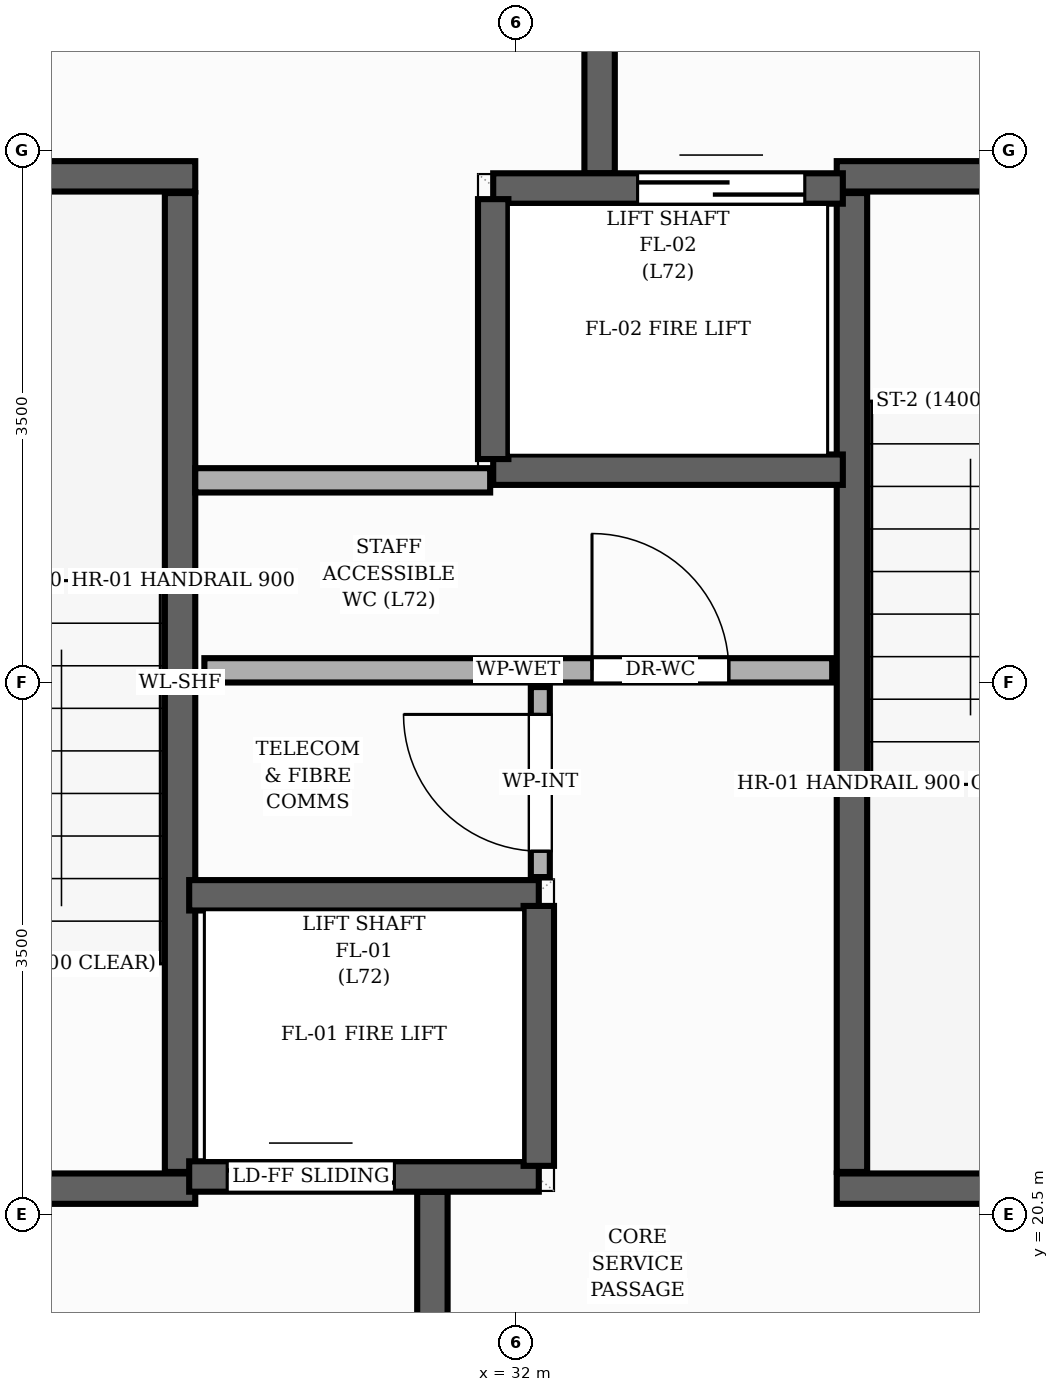
"""IFC4 building model, lengths in metres.
Left out: names, types, materials, properties, quantities, classifications, styles, units other than length and angle.
Written with IfcOpenShell. Run it as: python <this file> out.ifc"""

import sys

from ifc_helpers import new_model, si_unit, direction, frame, frame_2d, origin, place, context, subcontext, project, spatial, rectangle, extrude, element, fill, save


model = new_model("IFC4")
c1 = context("Model", 3, precision=1e-05, world=origin(), true_north=direction((0.0, 1.0)))
c2 = subcontext(c1, "Body", "Model", "MODEL_VIEW")
j1 = project(units=[si_unit("LENGTHUNIT", "METRE"), si_unit("PLANEANGLEUNIT", "RADIAN")], contexts=[c1])
p1 = place(None, origin())
s1 = spatial("IfcSite", under=j1, at=p1, CompositionType="ELEMENT")
p2 = place(p1, origin())
s2 = spatial("IfcBuilding", under=s1, at=p2, CompositionType="ELEMENT")
p3 = place(p2, frame((0.0, 0.0, 239.84)))
s3 = spatial("IfcBuildingStorey", under=s2, at=p3, CompositionType="ELEMENT", Elevation=239.84)
p4 = place(p3, frame((29.79, 20.78, 0.0), z_axis=(0.0, 0.0, 1.0), x_axis=(0.0, 1.0, 0.0)))
e1 = element("IfcWall", 1, at=p4, inside=s3, PredefinedType="SHEAR", context=c2, shape_type="SweptSolid", body=[
    extrude(rectangle(XDim=6.44, YDim=0.2, at=frame_2d((3.22, 0.0))), origin(), (0.0, 0.0, 1.0), 3.2),
])
p5 = place(p3, frame((26.65, 27.33, 0.0), z_axis=(0.0, 0.0, 1.0), x_axis=(1.0, 0.0, 0.0)))
e2 = element("IfcWall", 2, at=p5, inside=s3, PredefinedType="SHEAR", context=c2, shape_type="SweptSolid", body=[
    extrude(rectangle(XDim=3.24, YDim=0.2, at=frame_2d((1.62, 0.0))), origin(), (0.0, 0.0, 1.0), 3.2),
])
p6 = place(p3, frame((26.65, 20.67, 0.0), z_axis=(0.0, 0.0, 1.0), x_axis=(1.0, 0.0, 0.0)))
e3 = element("IfcWall", 3, at=p6, inside=s3, PredefinedType="SHEAR", context=c2, shape_type="SweptSolid", body=[
    extrude(rectangle(XDim=3.24, YDim=0.2, at=frame_2d((1.62, 0.0))), origin(), (0.0, 0.0, 1.0), 3.2),
])
p7 = place(p6, frame((1.055, 0.0, 0.0)))
e4 = element("IfcOpeningElement", 4, at=p7, cuts=e3, PredefinedType="OPENING", context=c2, shape_type="SweptSolid", body=[
    extrude(rectangle(XDim=1.05, YDim=2.15, at=frame_2d((0.525, 1.075))), frame((0.0, 0.11, 0.0), z_axis=(0.0, -1.0, 0.0), x_axis=(1.0, 0.0, 0.0)), (0.0, 0.0, 1.0), 0.22),
])
p8 = place(p3, frame((34.21, 20.78, 0.0), z_axis=(0.0, 0.0, 1.0), x_axis=(0.0, 1.0, 0.0)))
e5 = element("IfcWall", 5, at=p8, inside=s3, PredefinedType="SHEAR", context=c2, shape_type="SweptSolid", body=[
    extrude(rectangle(XDim=6.44, YDim=0.2, at=frame_2d((3.22, 0.0))), origin(), (0.0, 0.0, 1.0), 3.2),
])
p9 = place(p3, frame((34.11, 20.67, 0.0), z_axis=(0.0, 0.0, 1.0), x_axis=(1.0, 0.0, 0.0)))
e6 = element("IfcWall", 6, at=p9, inside=s3, PredefinedType="SHEAR", context=c2, shape_type="SweptSolid", body=[
    extrude(rectangle(XDim=3.24, YDim=0.2, at=frame_2d((1.62, 0.0))), origin(), (0.0, 0.0, 1.0), 3.2),
])
p10 = place(p3, frame((34.11, 27.33, 0.0), z_axis=(0.0, 0.0, 1.0), x_axis=(1.0, 0.0, 0.0)))
e7 = element("IfcWall", 7, at=p10, inside=s3, PredefinedType="SHEAR", context=c2, shape_type="SweptSolid", body=[
    extrude(rectangle(XDim=3.24, YDim=0.2, at=frame_2d((1.62, 0.0))), origin(), (0.0, 0.0, 1.0), 3.2),
])
p11 = place(p10, frame((1.135, 0.0, 0.0)))
e8 = element("IfcOpeningElement", 8, at=p11, cuts=e7, PredefinedType="OPENING", context=c2, shape_type="SweptSolid", body=[
    extrude(rectangle(XDim=1.05, YDim=2.15, at=frame_2d((0.525, 1.075))), frame((0.0, 0.11, 0.0), z_axis=(0.0, -1.0, 0.0), x_axis=(1.0, 0.0, 0.0)), (0.0, 0.0, 1.0), 0.22),
])
for number, where, z_axis, x_axis in (
    (9, (31.45, 17.15, 0.0), (0.0, 0.0, 1.0), (0.0, 1.0, 0.0)),
    (10, (32.55, 27.35, 0.0), (0.0, 0.0, 1.0), (0.0, 1.0, 0.0)),
):
    element("IfcWall", number, at=place(p3, frame(where, z_axis=z_axis, x_axis=x_axis)), inside=s3, PredefinedType="SHEAR", context=c2, shape_type="SweptSolid", body=[
        extrude(rectangle(XDim=3.5, YDim=0.2, at=frame_2d((1.75, 0.0))), origin(), (0.0, 0.0, 1.0), 3.2),
    ])
p12 = place(p3, frame((29.85, 20.75, 0.0), z_axis=(0.0, 0.0, 1.0), x_axis=(1.0, 0.0, 0.0)))
e11 = element("IfcWall", 11, at=p12, inside=s3, PredefinedType="SHEAR", context=c2, shape_type="SweptSolid", body=[
    extrude(rectangle(XDim=2.3, YDim=0.2, at=frame_2d((1.15, 0.0))), origin(), (0.0, 0.0, 1.0), 3.2),
])
p13 = place(p12, frame((0.25, 0.0, 0.0)))
e12 = element("IfcOpeningElement", 12, at=p13, cuts=e11, PredefinedType="OPENING", context=c2, shape_type="SweptSolid", body=[
    extrude(rectangle(XDim=1.1, YDim=2.15, at=frame_2d((0.55, 1.075))), frame((0.0, 0.11, 0.0), z_axis=(0.0, -1.0, 0.0), x_axis=(1.0, 0.0, 0.0)), (0.0, 0.0, 1.0), 0.22),
])
p14 = place(p3, frame((29.85, 22.6, 0.0), z_axis=(0.0, 0.0, 1.0), x_axis=(1.0, 0.0, 0.0)))
e13 = element("IfcWall", 13, at=p14, inside=s3, PredefinedType="SHEAR", context=c2, shape_type="SweptSolid", body=[
    extrude(rectangle(XDim=2.3, YDim=0.2, at=frame_2d((1.15, 0.0))), origin(), (0.0, 0.0, 1.0), 3.2),
])
p15 = place(p3, frame((32.15, 20.82, 0.0), z_axis=(0.0, 0.0, 1.0), x_axis=(0.0, 1.0, 0.0)))
e14 = element("IfcWall", 14, at=p15, inside=s3, PredefinedType="SHEAR", context=c2, shape_type="SweptSolid", body=[
    extrude(rectangle(XDim=1.71, YDim=0.2, at=frame_2d((0.855, 0.0))), origin(), (0.0, 0.0, 1.0), 3.2),
])
p16 = place(p3, frame((31.85, 27.25, 0.0), z_axis=(0.0, 0.0, 1.0), x_axis=(1.0, 0.0, 0.0)))
e15 = element("IfcWall", 15, at=p16, inside=s3, PredefinedType="SHEAR", context=c2, shape_type="SweptSolid", body=[
    extrude(rectangle(XDim=2.3, YDim=0.2, at=frame_2d((1.15, 0.0))), origin(), (0.0, 0.0, 1.0), 3.2),
])
p17 = place(p16, frame((0.95, 0.0, 0.0)))
e16 = element("IfcOpeningElement", 16, at=p17, cuts=e15, PredefinedType="OPENING", context=c2, shape_type="SweptSolid", body=[
    extrude(rectangle(XDim=1.1, YDim=2.15, at=frame_2d((0.55, 1.075))), frame((0.0, 0.11, 0.0), z_axis=(0.0, -1.0, 0.0), x_axis=(1.0, 0.0, 0.0)), (0.0, 0.0, 1.0), 0.22),
])
p18 = place(p3, frame((31.85, 25.4, 0.0), z_axis=(0.0, 0.0, 1.0), x_axis=(1.0, 0.0, 0.0)))
e17 = element("IfcWall", 17, at=p18, inside=s3, PredefinedType="SHEAR", context=c2, shape_type="SweptSolid", body=[
    extrude(rectangle(XDim=2.3, YDim=0.2, at=frame_2d((1.15, 0.0))), origin(), (0.0, 0.0, 1.0), 3.2),
])
p19 = place(p3, frame((31.85, 25.47, 0.0), z_axis=(0.0, 0.0, 1.0), x_axis=(0.0, 1.0, 0.0)))
e18 = element("IfcWall", 18, at=p19, inside=s3, PredefinedType="SHEAR", context=c2, shape_type="SweptSolid", body=[
    extrude(rectangle(XDim=1.71, YDim=0.2, at=frame_2d((0.855, 0.0))), origin(), (0.0, 0.0, 1.0), 3.2),
])
p20 = place(p3, frame((29.95, 24.08, 0.0), z_axis=(0.0, 0.0, 1.0), x_axis=(1.0, 0.0, 0.0)))
e19 = element("IfcWall", 19, at=p20, inside=s3, PredefinedType="PLUMBINGWALL", context=c2, shape_type="SweptSolid", body=[
    extrude(rectangle(XDim=4.13, YDim=0.16, at=frame_2d((2.065, 0.0))), origin(), (0.0, 0.0, 1.0), 2.875),
])
p21 = place(p20, frame((2.55, 0.0, 0.0)))
e20 = element("IfcOpeningElement", 20, at=p21, cuts=e19, PredefinedType="OPENING", context=c2, shape_type="SweptSolid", body=[
    extrude(rectangle(XDim=0.9, YDim=2.1, at=frame_2d((0.45, 1.05))), frame((0.0, 0.09, 0.0), z_axis=(0.0, -1.0, 0.0), x_axis=(1.0, 0.0, 0.0)), (0.0, 0.0, 1.0), 0.18),
])
p22 = place(p3, frame((32.16, 22.72, 0.0), z_axis=(0.0, 0.0, 1.0), x_axis=(0.0, 1.0, 0.0)))
e21 = element("IfcWall", 21, at=p22, inside=s3, PredefinedType="PARTITIONING", context=c2, shape_type="SweptSolid", body=[
    extrude(rectangle(XDim=1.25, YDim=0.125, at=frame_2d((0.625, 0.0))), origin(), (0.0, 0.0, 1.0), 2.875),
])
p23 = place(p22, frame((0.17, 0.0, 0.0)))
e22 = element("IfcOpeningElement", 22, at=p23, cuts=e21, PredefinedType="OPENING", context=c2, shape_type="SweptSolid", body=[
    extrude(rectangle(XDim=0.9, YDim=2.1, at=frame_2d((0.45, 1.05))), frame((0.0, 0.073, 0.0), z_axis=(0.0, -1.0, 0.0), x_axis=(1.0, 0.0, 0.0)), (0.0, 0.0, 1.0), 0.145),
])
p24 = place(p3, frame((29.89, 25.33, 0.0), z_axis=(0.0, 0.0, 1.0), x_axis=(1.0, 0.0, 0.0)))
e23 = element("IfcWall", 23, at=p24, inside=s3, PredefinedType="PLUMBINGWALL", context=c2, shape_type="SweptSolid", body=[
    extrude(rectangle(XDim=1.94, YDim=0.16, at=frame_2d((0.97, 0.0))), origin(), (0.0, 0.0, 1.0), 2.875),
])
p25 = place(p13, origin())
e24 = element("IfcDoor", 24, at=p25, inside=s3, OperationType="DOUBLE_DOOR_SLIDING", PredefinedType="DOOR", context=c2, shape_type="SweptSolid", body=[
    extrude(rectangle(XDim=1.1, YDim=2.15, at=frame_2d((0.55, 1.075))), frame((0.0, 0.025, 0.0), z_axis=(0.0, -1.0, 0.0), x_axis=(1.0, 0.0, 0.0)), (0.0, 0.0, 1.0), 0.05),
])
fill(e12, e24)
p26 = place(p17, origin())
e25 = element("IfcDoor", 25, at=p26, inside=s3, OperationType="DOUBLE_DOOR_SLIDING", PredefinedType="DOOR", context=c2, shape_type="SweptSolid", body=[
    extrude(rectangle(XDim=1.1, YDim=2.15, at=frame_2d((0.55, 1.075))), frame((0.0, 0.025, 0.0), z_axis=(0.0, -1.0, 0.0), x_axis=(1.0, 0.0, 0.0)), (0.0, 0.0, 1.0), 0.05),
])
fill(e16, e25)
p27 = place(p21, origin())
e26 = element("IfcDoor", 26, at=p27, inside=s3, OperationType="SINGLE_SWING_LEFT", PredefinedType="DOOR", context=c2, shape_type="SweptSolid", body=[
    extrude(rectangle(XDim=0.9, YDim=2.1, at=frame_2d((0.45, 1.05))), frame((0.0, 0.025, 0.0), z_axis=(0.0, -1.0, 0.0), x_axis=(1.0, 0.0, 0.0)), (0.0, 0.0, 1.0), 0.05),
])
fill(e20, e26)
p28 = place(p23, origin())
e27 = element("IfcDoor", 27, at=p28, inside=s3, OperationType="SINGLE_SWING_RIGHT", PredefinedType="DOOR", context=c2, shape_type="SweptSolid", body=[
    extrude(rectangle(XDim=0.9, YDim=2.1, at=frame_2d((0.45, 1.05))), frame((0.0, 0.025, 0.0), z_axis=(0.0, -1.0, 0.0), x_axis=(1.0, 0.0, 0.0)), (0.0, 0.0, 1.0), 0.05),
])
fill(e22, e27)
save(model, sys.argv[1])
